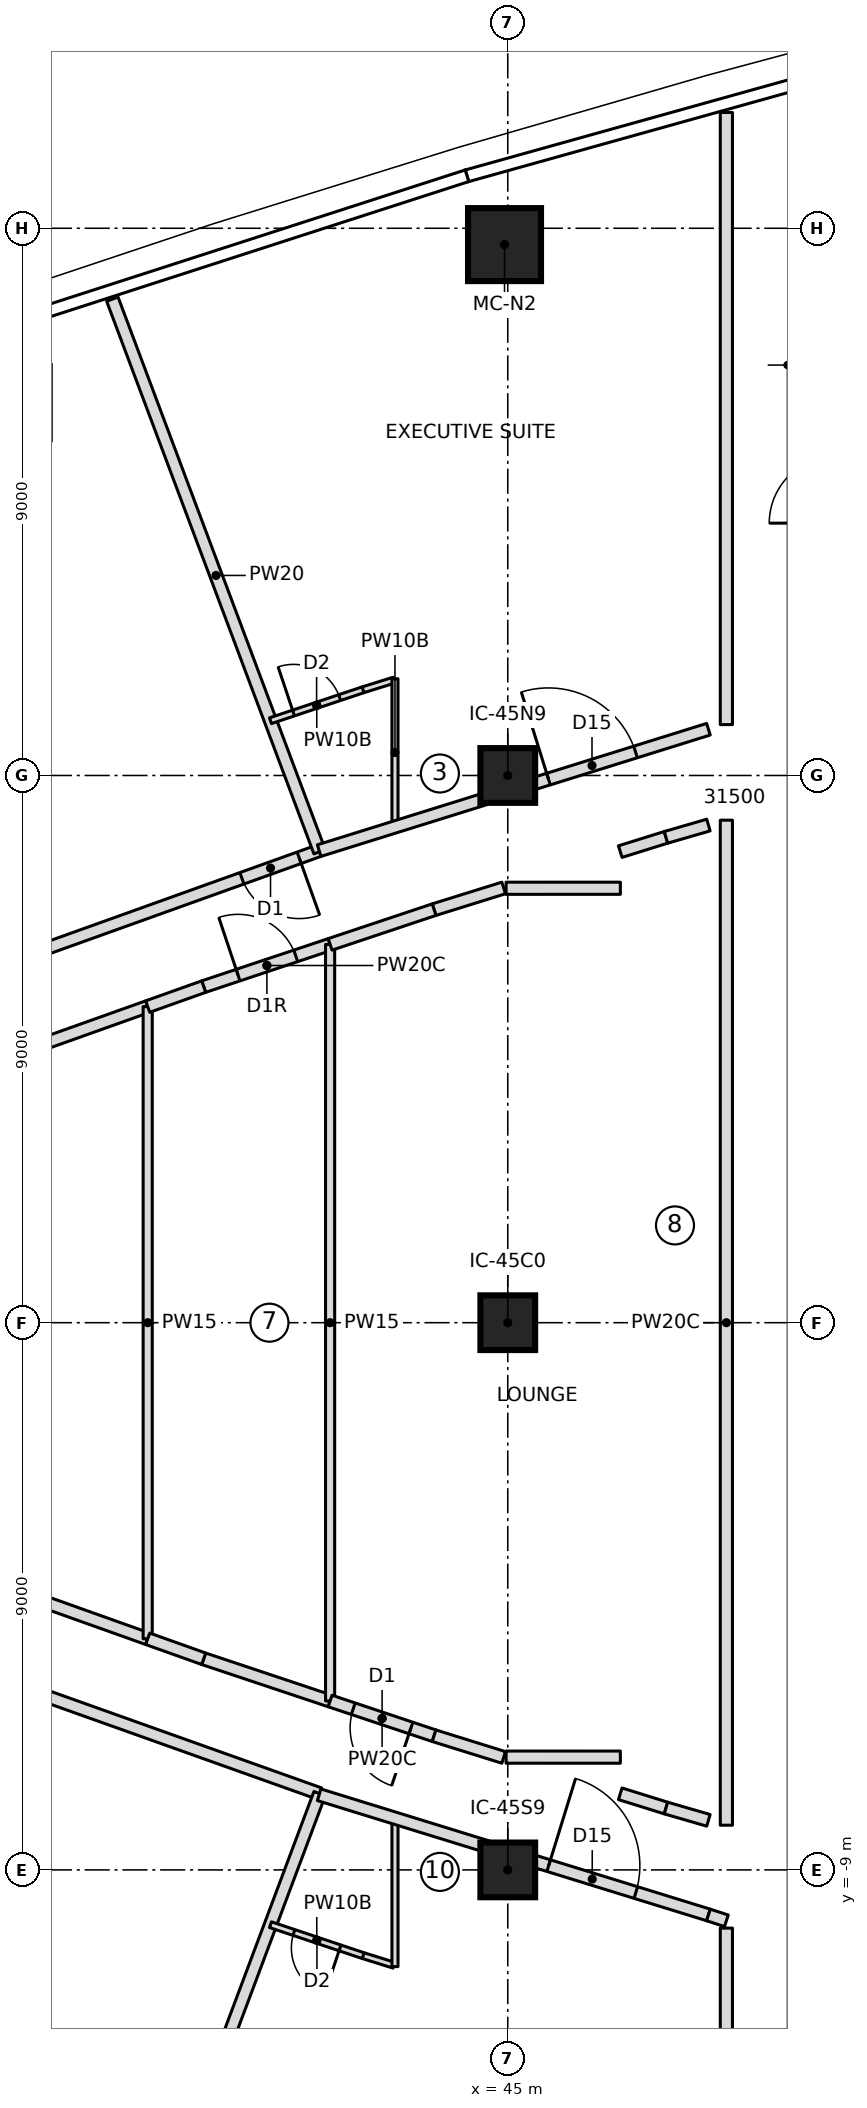
"""IFC4 building model, lengths in metres.
Left out: names, types, materials, properties, quantities, classifications, styles, units other than length and angle.
Written with IfcOpenShell. Run it as: python <this file> out.ifc"""

import sys

from ifc_helpers import new_model, si_unit, direction, frame, frame_2d, origin, origin_2d, place, context, subcontext, project, spatial, rectangle, extrude, element, fill, save


model = new_model("IFC4")
c1 = context("Model", 3, precision=1e-05, world=origin(), true_north=direction((0.0, 1.0)))
c2 = subcontext(c1, "Body", "Model", "MODEL_VIEW")
j1 = project(units=[si_unit("LENGTHUNIT", "METRE"), si_unit("PLANEANGLEUNIT", "RADIAN")], contexts=[c1])
p1 = place(None, origin())
s1 = spatial("IfcSite", under=j1, at=p1, CompositionType="ELEMENT")
p2 = place(p1, origin())
s2 = spatial("IfcBuilding", under=s1, at=p2, CompositionType="ELEMENT")
p3 = place(p2, frame((0.0, 0.0, 231.45)))
s3 = spatial("IfcBuildingStorey", under=s2, at=p3, CompositionType="ELEMENT", Elevation=231.45)
p4 = place(p3, frame((44.947, 17.731, 0.0), z_axis=(0.0, 0.0, 1.0), x_axis=(1.0, 0.0, 0.0)))
e1 = element("IfcColumn", 1, at=p4, inside=s3, PredefinedType="COLUMN", context=c2, shape_type="SweptSolid", body=[
    extrude(rectangle(XDim=1.2, YDim=1.2, at=origin_2d()), origin(), (0.0, 0.0, 1.0), 3.55),
])
for number, where, z_axis, x_axis in (
    (2, (45.0, -9.0, 0.0), (0.0, 0.0, 1.0), (1.0, 0.0, 0.0)),
    (3, (45.0, 0.0, 0.0), (0.0, 0.0, 1.0), (1.0, 0.0, 0.0)),
    (4, (45.0, 9.0, 0.0), (0.0, 0.0, 1.0), (1.0, 0.0, 0.0)),
):
    element("IfcColumn", number, at=place(p3, frame(where, z_axis=z_axis, x_axis=x_axis)), inside=s3, PredefinedType="COLUMN", context=c2, shape_type="SweptSolid", body=[
        extrude(rectangle(XDim=0.9, YDim=0.9, at=origin_2d()), origin(), (0.0, 0.0, 1.0), 3.55),
    ])
p5 = place(p3, frame((41.898, 7.764, 0.0), z_axis=(0.0, 0.0, 1.0), x_axis=(-0.941277643829, -0.337633525034, 0.0)))
e5 = element("IfcWall", 5, at=p5, inside=s3, PredefinedType="PARTITIONING", context=c2, shape_type="SweptSolid", body=[
    extrude(rectangle(XDim=10.001, YDim=0.2, at=frame_2d((5.0, 0.0))), origin(), (0.0, 0.0, 1.0), 3.25),
])
p6 = place(p5, frame((0.35, 0.0, 0.0)))
e6 = element("IfcOpeningElement", 6, at=p6, cuts=e5, PredefinedType="OPENING", context=c2, shape_type="SweptSolid", body=[
    extrude(rectangle(XDim=1.0, YDim=2.1, at=frame_2d((0.5, 1.05))), frame((0.0, 0.11, 0.0), z_axis=(0.0, -1.0, 0.0), x_axis=(1.0, 0.0, 0.0)), (0.0, 0.0, 1.0), 0.22),
])
p7 = place(p3, frame((41.906, 7.746, 0.0), z_axis=(0.0, 0.0, 1.0), x_axis=(-0.35112895446, 0.936327110224, 0.0)))
e7 = element("IfcWall", 7, at=p7, inside=s3, PredefinedType="PARTITIONING", context=c2, shape_type="SweptSolid", body=[
    extrude(rectangle(XDim=9.706, YDim=0.2, at=frame_2d((4.853, 0.0))), origin(), (0.0, 0.0, 1.0), 3.25),
])
p8 = place(p3, frame((41.097, 9.901, 0.0), z_axis=(0.0, 0.0, 1.0), x_axis=(0.948485479965, 0.3168206027, 0.0)))
e8 = element("IfcWall", 8, at=p8, inside=s3, PredefinedType="PARTITIONING", context=c2, shape_type="SweptSolid", body=[
    extrude(rectangle(XDim=1.606, YDim=0.1, at=frame_2d((0.803, 0.0))), origin(), (0.0, 0.0, 1.0), 3.25),
])
p9 = place(p8, frame((0.4, 0.0, 0.0)))
e9 = element("IfcOpeningElement", 9, at=p9, cuts=e8, PredefinedType="OPENING", context=c2, shape_type="SweptSolid", body=[
    extrude(rectangle(XDim=0.8, YDim=2.1, at=frame_2d((0.4, 1.05))), frame((0.0, 0.06, 0.0), z_axis=(0.0, -1.0, 0.0), x_axis=(1.0, 0.0, 0.0)), (0.0, 0.0, 1.0), 0.12),
])
p10 = place(p3, frame((42.621, 10.409, 0.0), z_axis=(0.0, 0.0, 1.0), x_axis=(0.954618903587, 0.297830067176, 0.0)))
e10 = element("IfcWall", 10, at=p10, inside=s3, PredefinedType="PARTITIONING", context=c2, shape_type="SweptSolid", body=[
    extrude(rectangle(XDim=0.531, YDim=0.1, at=frame_2d((0.266, 0.0))), origin(), (0.0, 0.0, 1.0), 3.25),
])
p11 = place(p3, frame((32.485, -4.388, 0.0), z_axis=(0.0, 0.0, 1.0), x_axis=(0.941953797829, -0.335742524498, 0.0)))
e11 = element("IfcWall", 11, at=p11, inside=s3, PredefinedType="PARTITIONING", context=c2, shape_type="SweptSolid", body=[
    extrude(rectangle(XDim=10.001, YDim=0.2, at=frame_2d((5.001, 0.0))), origin(), (0.0, 0.0, 1.0), 3.25),
])
p12 = place(p11, frame((3.7, 0.0, 0.0)))
e12 = element("IfcOpeningElement", 12, at=p12, cuts=e11, PredefinedType="OPENING", context=c2, shape_type="SweptSolid", body=[
    extrude(rectangle(XDim=1.0, YDim=2.1, at=frame_2d((0.5, 1.05))), frame((0.0, 0.11, 0.0), z_axis=(0.0, -1.0, 0.0), x_axis=(1.0, 0.0, 0.0)), (0.0, 0.0, 1.0), 0.22),
])
p13 = place(p3, frame((38.497, -16.834, 0.0), z_axis=(0.0, 0.0, 1.0), x_axis=(0.35112895446, 0.936327110224, 0.0)))
e13 = element("IfcWall", 13, at=p13, inside=s3, PredefinedType="PARTITIONING", context=c2, shape_type="SweptSolid", body=[
    extrude(rectangle(XDim=9.706, YDim=0.2, at=frame_2d((4.853, 0.0))), origin(), (0.0, 0.0, 1.0), 3.25),
])
p14 = place(p3, frame((43.128, -10.568, 0.0), z_axis=(0.0, 0.0, 1.0), x_axis=(-0.954618903587, 0.297830067176, 0.0)))
e14 = element("IfcWall", 14, at=p14, inside=s3, PredefinedType="PARTITIONING", context=c2, shape_type="SweptSolid", body=[
    extrude(rectangle(XDim=0.531, YDim=0.1, at=frame_2d((0.266, 0.0))), origin(), (0.0, 0.0, 1.0), 3.25),
])
p15 = place(p3, frame((42.621, -10.409, 0.0), z_axis=(0.0, 0.0, 1.0), x_axis=(-0.948485479965, 0.3168206027, 0.0)))
e15 = element("IfcWall", 15, at=p15, inside=s3, PredefinedType="PARTITIONING", context=c2, shape_type="SweptSolid", body=[
    extrude(rectangle(XDim=1.606, YDim=0.1, at=frame_2d((0.803, 0.0))), origin(), (0.0, 0.0, 1.0), 3.25),
])
p16 = place(p15, frame((0.4, 0.0, 0.0)))
e16 = element("IfcOpeningElement", 16, at=p16, cuts=e15, PredefinedType="OPENING", context=c2, shape_type="SweptSolid", body=[
    extrude(rectangle(XDim=0.8, YDim=2.1, at=frame_2d((0.4, 1.05))), frame((0.0, 0.06, 0.0), z_axis=(0.0, -1.0, 0.0), x_axis=(1.0, 0.0, 0.0)), (0.0, 0.0, 1.0), 0.12),
])
for number, where, z_axis, x_axis in (
    (17, (39.078, -5.199, 0.0), (0.0, 0.0, 1.0), (-0.942, 0.336, 0.0)),
    (18, (36.236, 4.186, 0.0), (0.0, 0.0, 1.0), (0.942, 0.336, 0.0)),
):
    element("IfcWall", number, at=place(p3, frame(where, z_axis=z_axis, x_axis=x_axis)), inside=s3, PredefinedType="PARTITIONING", context=c2, shape_type="SweptSolid", body=[
        extrude(rectangle(XDim=3.017, YDim=0.2, at=frame_2d((1.509, 0.0))), origin(), (0.0, 0.0, 1.0), 3.25),
    ])
p17 = place(p3, frame((39.078, -5.199, 0.0), z_axis=(0.0, 0.0, 1.0), x_axis=(0.0, 1.0, 0.0)))
e19 = element("IfcWall", 19, at=p17, inside=s3, PredefinedType="PARTITIONING", context=c2, shape_type="SweptSolid", body=[
    extrude(rectangle(XDim=10.398, YDim=0.15, at=frame_2d((5.199, 0.0))), origin(), (0.0, 0.0, 1.0), 3.25),
])
p18 = place(p3, frame((39.999, 5.527, 0.0), z_axis=(0.0, 0.0, 1.0), x_axis=(0.9484714727, 0.316862534034, 0.0)))
e20 = element("IfcWall", 20, at=p18, inside=s3, PredefinedType="PARTITIONING", context=c2, shape_type="SweptSolid", body=[
    extrude(rectangle(XDim=2.192, YDim=0.2, at=frame_2d((1.096, 0.0))), origin(), (0.0, 0.0, 1.0), 3.25),
])
p19 = place(p18, frame((0.596, 0.0, 0.0)))
e21 = element("IfcOpeningElement", 21, at=p19, cuts=e20, PredefinedType="OPENING", context=c2, shape_type="SweptSolid", body=[
    extrude(rectangle(XDim=1.0, YDim=2.1, at=frame_2d((0.5, 1.05))), frame((0.0, 0.11, 0.0), z_axis=(0.0, -1.0, 0.0), x_axis=(1.0, 0.0, 0.0)), (0.0, 0.0, 1.0), 0.22),
])
p20 = place(p3, frame((42.078, -6.222, 0.0), z_axis=(0.0, 0.0, 1.0), x_axis=(-0.9484714727, 0.316862534034, 0.0)))
e22 = element("IfcWall", 22, at=p20, inside=s3, PredefinedType="PARTITIONING", context=c2, shape_type="SweptSolid", body=[
    extrude(rectangle(XDim=2.192, YDim=0.2, at=frame_2d((1.096, 0.0))), origin(), (0.0, 0.0, 1.0), 3.25),
])
for number, where, z_axis, x_axis in (
    (23, (39.999, -5.527, 0.0), (0.0, 0.0, 1.0), (-0.942, 0.336, 0.0)),
    (24, (39.078, 5.199, 0.0), (0.0, 0.0, 1.0), (0.942, 0.336, 0.0)),
):
    element("IfcWall", number, at=place(p3, frame(where, z_axis=z_axis, x_axis=x_axis)), inside=s3, PredefinedType="PARTITIONING", context=c2, shape_type="SweptSolid", body=[
        extrude(rectangle(XDim=0.978, YDim=0.2, at=frame_2d((0.489, 0.0))), origin(), (0.0, 0.0, 1.0), 3.25),
    ])
p21 = place(p3, frame((42.078, -6.222, 0.0), z_axis=(0.0, 0.0, 1.0), x_axis=(0.0, 1.0, 0.0)))
e25 = element("IfcWall", 25, at=p21, inside=s3, PredefinedType="PARTITIONING", context=c2, shape_type="SweptSolid", body=[
    extrude(rectangle(XDim=12.444, YDim=0.15, at=frame_2d((6.222, 0.0))), origin(), (0.0, 0.0, 1.0), 3.25),
])
p22 = place(p3, frame((43.788, -6.793, 0.0), z_axis=(0.0, 0.0, 1.0), x_axis=(-0.948466406859, 0.316877697323, 0.0)))
e26 = element("IfcWall", 26, at=p22, inside=s3, PredefinedType="PARTITIONING", context=c2, shape_type="SweptSolid", body=[
    extrude(rectangle(XDim=1.803, YDim=0.2, at=frame_2d((0.901, 0.0))), origin(), (0.0, 0.0, 1.0), 3.25),
])
p23 = place(p22, frame((0.402, 0.0, 0.0)))
e27 = element("IfcOpeningElement", 27, at=p23, cuts=e26, PredefinedType="OPENING", context=c2, shape_type="SweptSolid", body=[
    extrude(rectangle(XDim=1.0, YDim=2.1, at=frame_2d((0.5, 1.05))), frame((0.0, 0.11, 0.0), z_axis=(0.0, -1.0, 0.0), x_axis=(1.0, 0.0, 0.0)), (0.0, 0.0, 1.0), 0.22),
])
p24 = place(p3, frame((43.788, 6.793, 0.0), z_axis=(0.0, 0.0, 1.0), x_axis=(0.954693570678, 0.29759063511, 0.0)))
e28 = element("IfcWall", 28, at=p24, inside=s3, PredefinedType="PARTITIONING", context=c2, shape_type="SweptSolid", body=[
    extrude(rectangle(XDim=1.198, YDim=0.2, at=frame_2d((0.599, 0.0))), origin(), (0.0, 0.0, 1.0), 3.25),
])
for number, where, z_axis, x_axis in (
    (29, (46.85, 7.748, 0.0), (0.0, 0.0, 1.0), (0.955, 0.298, 0.0)),
    (30, (47.602, -7.982, 0.0), (0.0, 0.0, 1.0), (-0.955, 0.298, 0.0)),
):
    element("IfcWall", number, at=place(p3, frame(where, z_axis=z_axis, x_axis=x_axis)), inside=s3, PredefinedType="PARTITIONING", context=c2, shape_type="SweptSolid", body=[
        extrude(rectangle(XDim=0.788, YDim=0.2, at=frame_2d((0.394, 0.0))), origin(), (0.0, 0.0, 1.0), 3.25),
    ])
p25 = place(p3, frame((44.933, -7.15, 0.0), z_axis=(0.0, 0.0, 1.0), x_axis=(-0.954693570678, 0.29759063511, 0.0)))
e31 = element("IfcWall", 31, at=p25, inside=s3, PredefinedType="PARTITIONING", context=c2, shape_type="SweptSolid", body=[
    extrude(rectangle(XDim=1.198, YDim=0.2, at=frame_2d((0.599, 0.0))), origin(), (0.0, 0.0, 1.0), 3.25),
])
p26 = place(p3, frame((42.078, 6.222, 0.0), z_axis=(0.0, 0.0, 1.0), x_axis=(0.948466406859, 0.316877697323, 0.0)))
e32 = element("IfcWall", 32, at=p26, inside=s3, PredefinedType="PARTITIONING", context=c2, shape_type="SweptSolid", body=[
    extrude(rectangle(XDim=1.803, YDim=0.2, at=frame_2d((0.901, 0.0))), origin(), (0.0, 0.0, 1.0), 3.25),
])
for number, where, z_axis, x_axis in (
    (33, (43.145, 10.59, 0.0), (0.0, 0.0, 1.0), (0.0, -1.0, 0.0)),
    (34, (43.145, -8.165, 0.0), (0.0, 0.0, 1.0), (0.0, -1.0, 0.0)),
):
    element("IfcWall", number, at=place(p3, frame(where, z_axis=z_axis, x_axis=x_axis)), inside=s3, PredefinedType="PARTITIONING", context=c2, shape_type="SweptSolid", body=[
        extrude(rectangle(XDim=2.425, YDim=0.1, at=frame_2d((1.213, 0.0))), origin(), (0.0, 0.0, 1.0), 3.25),
    ])
p27 = place(p3, frame((41.898, 7.764, 0.0), z_axis=(0.0, 0.0, 1.0), x_axis=(0.954667015156, 0.297675813886, 0.0)))
e35 = element("IfcWall", 35, at=p27, inside=s3, PredefinedType="PARTITIONING", context=c2, shape_type="SweptSolid", body=[
    extrude(rectangle(XDim=6.706, YDim=0.2, at=frame_2d((3.353, 0.0))), origin(), (0.0, 0.0, 1.0), 3.25),
])
p28 = place(p27, frame((3.95, 0.0, 0.0)))
e36 = element("IfcOpeningElement", 36, at=p28, cuts=e35, PredefinedType="OPENING", context=c2, shape_type="SweptSolid", body=[
    extrude(rectangle(XDim=1.5, YDim=2.1, at=frame_2d((0.75, 1.05))), frame((0.0, 0.11, 0.0), z_axis=(0.0, -1.0, 0.0), x_axis=(1.0, 0.0, 0.0)), (0.0, 0.0, 1.0), 0.22),
])
p29 = place(p3, frame((41.898, -7.764, 0.0), z_axis=(0.0, 0.0, 1.0), x_axis=(0.955502033518, -0.294984514752, 0.0)))
e37 = element("IfcWall", 37, at=p29, inside=s3, PredefinedType="PARTITIONING", context=c2, shape_type="SweptSolid", body=[
    extrude(rectangle(XDim=6.7, YDim=0.2, at=frame_2d((3.35, 0.0))), origin(), (0.0, 0.0, 1.0), 3.25),
])
p30 = place(p29, frame((3.95, 0.0, 0.0)))
e38 = element("IfcOpeningElement", 38, at=p30, cuts=e37, PredefinedType="OPENING", context=c2, shape_type="SweptSolid", body=[
    extrude(rectangle(XDim=1.5, YDim=2.1, at=frame_2d((0.75, 1.05))), frame((0.0, 0.11, 0.0), z_axis=(0.0, -1.0, 0.0), x_axis=(1.0, 0.0, 0.0)), (0.0, 0.0, 1.0), 0.22),
])
for number, where, z_axis, x_axis in (
    (39, (47.602, 7.982, 0.0), (0.0, 0.0, 1.0), (0.96, 0.278, 0.0)),
    (40, (48.3, -8.185, 0.0), (0.0, 0.0, 1.0), (-0.96, 0.278, 0.0)),
):
    element("IfcWall", number, at=place(p3, frame(where, z_axis=z_axis, x_axis=x_axis)), inside=s3, PredefinedType="PARTITIONING", context=c2, shape_type="SweptSolid", body=[
        extrude(rectangle(XDim=0.727, YDim=0.2, at=frame_2d((0.363, 0.0))), origin(), (0.0, 0.0, 1.0), 3.25),
    ])
p31 = place(p3, frame((44.972, 7.145, 0.0), z_axis=(0.0, 0.0, 1.0), x_axis=(0.99999999156, 0.000129920747, 0.0)))
e41 = element("IfcWall", 41, at=p31, inside=s3, PredefinedType="PARTITIONING", context=c2, shape_type="SweptSolid", body=[
    extrude(rectangle(XDim=1.879, YDim=0.2, at=frame_2d((0.939, 0.0))), origin(), (0.0, 0.0, 1.0), 3.25),
])
p32 = place(p3, frame((48.595, 8.265, 0.0), z_axis=(0.0, 0.0, 1.0), x_axis=(0.0, -1.0, 0.0)))
e42 = element("IfcWall", 42, at=p32, inside=s3, PredefinedType="PARTITIONING", context=c2, shape_type="SweptSolid", body=[
    extrude(rectangle(XDim=16.53, YDim=0.2, at=frame_2d((8.265, 0.0))), origin(), (0.0, 0.0, 1.0), 3.25),
])
p33 = place(p3, frame((46.852, -7.145, 0.0), z_axis=(0.0, 0.0, 1.0), x_axis=(-0.99999999156, 0.000129920747, 0.0)))
e43 = element("IfcWall", 43, at=p33, inside=s3, PredefinedType="PARTITIONING", context=c2, shape_type="SweptSolid", body=[
    extrude(rectangle(XDim=1.879, YDim=0.2, at=frame_2d((0.939, 0.0))), origin(), (0.0, 0.0, 1.0), 3.25),
])
p34 = place(p3, frame((48.595, 19.904, 0.0), z_axis=(0.0, 0.0, 1.0), x_axis=(0.0, -1.0, 0.0)))
e44 = element("IfcWall", 44, at=p34, inside=s3, PredefinedType="PARTITIONING", context=c2, shape_type="SweptSolid", body=[
    extrude(rectangle(XDim=10.067, YDim=0.2, at=frame_2d((5.034, 0.0))), origin(), (0.0, 0.0, 1.0), 3.25),
])
p35 = place(p3, frame((48.3, -9.741, 0.0), z_axis=(0.0, 0.0, 1.0), x_axis=(0.950709666312, -0.31008245739, 0.0)))
e45 = element("IfcWall", 45, at=p35, inside=s3, PredefinedType="PARTITIONING", context=c2, shape_type="SweptSolid", body=[
    extrude(rectangle(XDim=0.31, YDim=0.2, at=frame_2d((0.155, 0.0))), origin(), (0.0, 0.0, 1.0), 3.25),
])
p36 = place(p3, frame((48.595, -9.957, 0.0), z_axis=(0.0, 0.0, 1.0), x_axis=(0.0, -1.0, 0.0)))
e46 = element("IfcWall", 46, at=p36, inside=s3, PredefinedType="PARTITIONING", context=c2, shape_type="SweptSolid", body=[
    extrude(rectangle(XDim=9.947, YDim=0.2, at=frame_2d((4.974, 0.0))), origin(), (0.0, 0.0, 1.0), 3.25),
])
p37 = place(p6, origin())
e47 = element("IfcDoor", 47, at=p37, inside=s3, OperationType="SINGLE_SWING_LEFT", PredefinedType="DOOR", context=c2, shape_type="SweptSolid", body=[
    extrude(rectangle(XDim=1.0, YDim=2.1, at=frame_2d((0.5, 1.05))), frame((0.0, 0.025, 0.0), z_axis=(0.0, -1.0, 0.0), x_axis=(1.0, 0.0, 0.0)), (0.0, 0.0, 1.0), 0.05),
])
fill(e6, e47)
p38 = place(p9, origin())
e48 = element("IfcDoor", 48, at=p38, inside=s3, OperationType="SINGLE_SWING_LEFT", PredefinedType="DOOR", context=c2, shape_type="SweptSolid", body=[
    extrude(rectangle(XDim=0.8, YDim=2.1, at=frame_2d((0.4, 1.05))), frame((0.0, 0.025, 0.0), z_axis=(0.0, -1.0, 0.0), x_axis=(1.0, 0.0, 0.0)), (0.0, 0.0, 1.0), 0.05),
])
fill(e9, e48)
p39 = place(p28, origin())
e49 = element("IfcDoor", 49, at=p39, inside=s3, OperationType="DOUBLE_DOOR_SINGLE_SWING", PredefinedType="DOOR", context=c2, shape_type="SweptSolid", body=[
    extrude(rectangle(XDim=1.5, YDim=2.1, at=frame_2d((0.75, 1.05))), frame((0.0, 0.025, 0.0), z_axis=(0.0, -1.0, 0.0), x_axis=(1.0, 0.0, 0.0)), (0.0, 0.0, 1.0), 0.05),
])
fill(e36, e49)
p40 = place(p16, origin())
e50 = element("IfcDoor", 50, at=p40, inside=s3, OperationType="SINGLE_SWING_LEFT", PredefinedType="DOOR", context=c2, shape_type="SweptSolid", body=[
    extrude(rectangle(XDim=0.8, YDim=2.1, at=frame_2d((0.4, 1.05))), frame((0.0, 0.025, 0.0), z_axis=(0.0, -1.0, 0.0), x_axis=(1.0, 0.0, 0.0)), (0.0, 0.0, 1.0), 0.05),
])
fill(e16, e50)
p41 = place(p30, origin())
e51 = element("IfcDoor", 51, at=p41, inside=s3, OperationType="DOUBLE_DOOR_SINGLE_SWING", PredefinedType="DOOR", context=c2, shape_type="SweptSolid", body=[
    extrude(rectangle(XDim=1.5, YDim=2.1, at=frame_2d((0.75, 1.05))), frame((0.0, 0.025, 0.0), z_axis=(0.0, -1.0, 0.0), x_axis=(1.0, 0.0, 0.0)), (0.0, 0.0, 1.0), 0.05),
])
fill(e38, e51)
p42 = place(p19, origin())
e52 = element("IfcDoor", 52, at=p42, inside=s3, OperationType="SINGLE_SWING_RIGHT", PredefinedType="DOOR", context=c2, shape_type="SweptSolid", body=[
    extrude(rectangle(XDim=1.0, YDim=2.1, at=frame_2d((0.5, 1.05))), frame((0.0, 0.025, 0.0), z_axis=(0.0, -1.0, 0.0), x_axis=(1.0, 0.0, 0.0)), (0.0, 0.0, 1.0), 0.05),
])
fill(e21, e52)
p43 = place(p23, origin())
e53 = element("IfcDoor", 53, at=p43, inside=s3, OperationType="SINGLE_SWING_LEFT", PredefinedType="DOOR", context=c2, shape_type="SweptSolid", body=[
    extrude(rectangle(XDim=1.0, YDim=2.1, at=frame_2d((0.5, 1.05))), frame((0.0, 0.025, 0.0), z_axis=(0.0, -1.0, 0.0), x_axis=(1.0, 0.0, 0.0)), (0.0, 0.0, 1.0), 0.05),
])
fill(e27, e53)
save(model, sys.argv[1])
